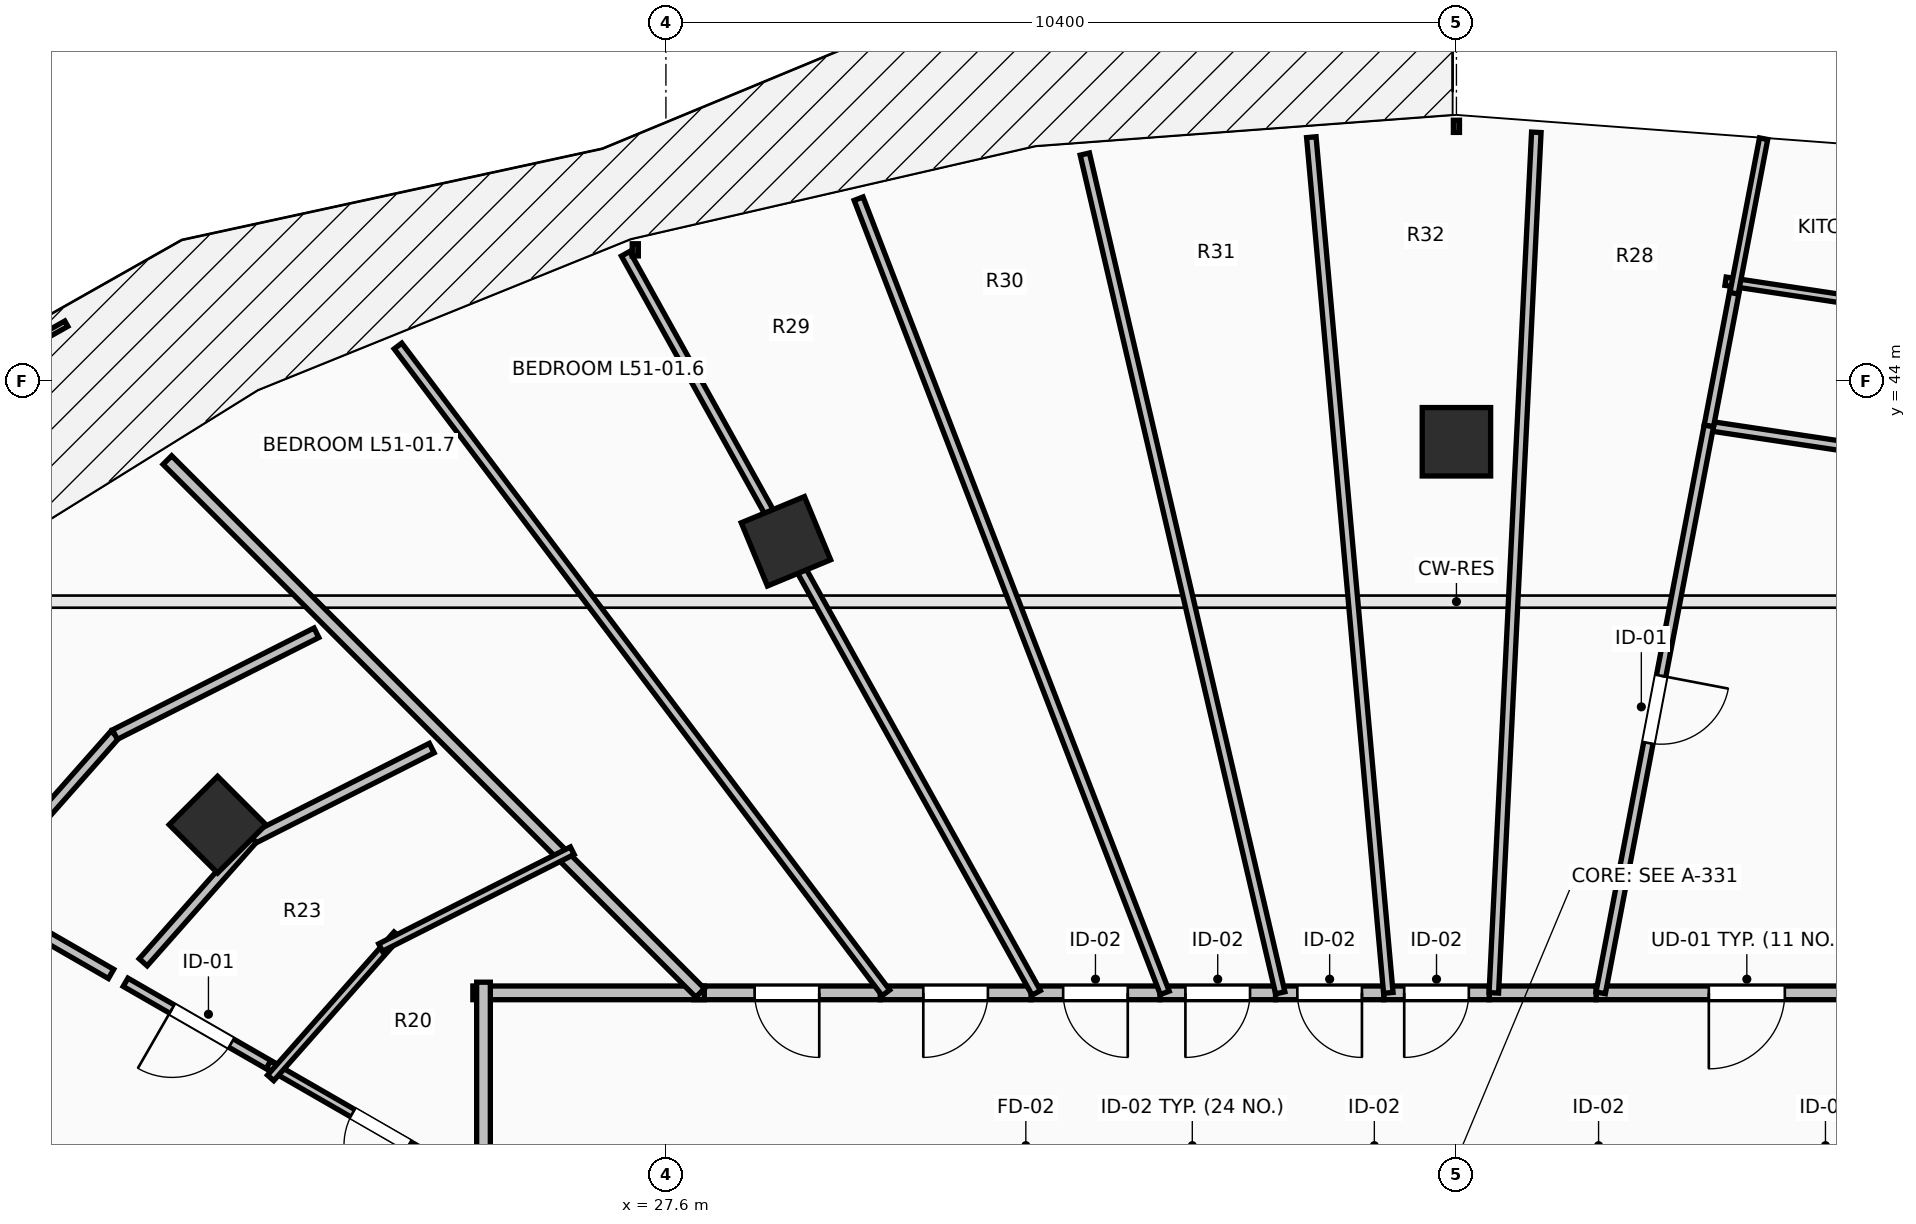
"""IFC4 building model, lengths in metres.
Left out: names, types, materials, properties, quantities, classifications, styles, units other than length and angle.
Written with IfcOpenShell. Run it as: python <this file> out.ifc"""

import sys

from ifc_helpers import new_model, si_unit, direction, frame, frame_2d, origin, origin_2d, place, context, subcontext, project, spatial, rectangle, extrude, element, fill, save


model = new_model("IFC4")
c1 = context("Model", 3, precision=1e-05, world=origin(), true_north=direction((0.0, 1.0)))
c2 = subcontext(c1, "Body", "Model", "MODEL_VIEW")
j1 = project(units=[si_unit("LENGTHUNIT", "METRE"), si_unit("PLANEANGLEUNIT", "RADIAN")], contexts=[c1])
p1 = place(None, origin())
s1 = spatial("IfcSite", under=j1, at=p1, CompositionType="ELEMENT")
p2 = place(p1, origin())
s2 = spatial("IfcBuilding", under=s1, at=p2, CompositionType="ELEMENT")
p3 = place(p2, frame((0.0, 0.0, 189.6)))
s3 = spatial("IfcBuildingStorey", under=s2, at=p3, CompositionType="ELEMENT", Elevation=189.6)
for number, where, z_axis, x_axis in (
    (1, (38.0, 43.2, 0.0), (0.0, 0.0, 1.0), (0.0, 1.0, 0.0)),
    (2, (29.179, 41.891, 0.0), (0.0, 0.0, 1.0), (-0.383, 0.924, 0.0)),
    (3, (21.701, 38.162, 0.0), (0.0, 0.0, 1.0), (-0.707, 0.707, 0.0)),
):
    element("IfcColumn", number, at=place(p3, frame(where, z_axis=z_axis, x_axis=x_axis)), inside=s3, PredefinedType="COLUMN", context=c2, shape_type="SweptSolid", body=[
        extrude(rectangle(XDim=0.9, YDim=0.9, at=origin_2d()), origin(), (0.0, 0.0, 1.0), 3.5),
    ])
p4 = place(p3, frame((43.803, 35.95, 0.0), z_axis=(0.0, 0.0, 1.0), x_axis=(-1.0, 0.0, 0.0)))
e4 = element("IfcWall", 4, at=p4, inside=s3, PredefinedType="PARTITIONING", context=c2, shape_type="SweptSolid", body=[
    extrude(rectangle(XDim=3.965, YDim=0.18, at=frame_2d((1.982, 0.0))), origin(), (0.0, 0.0, 1.0), 3.24),
])
p5 = place(p4, frame((1.482, 0.0, 0.0)))
e5 = element("IfcOpeningElement", 5, at=p5, cuts=e4, PredefinedType="OPENING", context=c2, shape_type="SweptSolid", body=[
    extrude(rectangle(XDim=1.0, YDim=2.15, at=frame_2d((0.5, 1.075))), frame((0.0, 0.105, 0.0), z_axis=(0.0, -1.0, 0.0), x_axis=(1.0, 0.0, 0.0)), (0.0, 0.0, 1.0), 0.21),
])
p6 = place(p3, frame((39.838, 35.95, 0.0), z_axis=(0.0, 0.0, 1.0), x_axis=(-1.0, 0.0, 0.0)))
e6 = element("IfcWall", 6, at=p6, inside=s3, PredefinedType="PARTITIONING", context=c2, shape_type="SweptSolid", body=[
    extrude(rectangle(XDim=1.406, YDim=0.18, at=frame_2d((0.703, 0.0))), origin(), (0.0, 0.0, 1.0), 3.24),
])
p7 = place(p3, frame((38.432, 35.95, 0.0), z_axis=(0.0, 0.0, 1.0), x_axis=(-1.0, 0.0, 0.0)))
e7 = element("IfcWall", 7, at=p7, inside=s3, PredefinedType="PARTITIONING", context=c2, shape_type="SweptSolid", body=[
    extrude(rectangle(XDim=1.388, YDim=0.18, at=frame_2d((0.694, 0.0))), origin(), (0.0, 0.0, 1.0), 3.24),
])
p8 = place(p7, frame((0.269, 0.0, 0.0)))
e8 = element("IfcOpeningElement", 8, at=p8, cuts=e7, PredefinedType="OPENING", context=c2, shape_type="SweptSolid", body=[
    extrude(rectangle(XDim=0.85, YDim=2.1, at=frame_2d((0.425, 1.05))), frame((0.0, 0.105, 0.0), z_axis=(0.0, -1.0, 0.0), x_axis=(1.0, 0.0, 0.0)), (0.0, 0.0, 1.0), 0.21),
])
p9 = place(p3, frame((37.044, 35.95, 0.0), z_axis=(0.0, 0.0, 1.0), x_axis=(-1.0, 0.0, 0.0)))
e9 = element("IfcWall", 9, at=p9, inside=s3, PredefinedType="PARTITIONING", context=c2, shape_type="SweptSolid", body=[
    extrude(rectangle(XDim=1.424, YDim=0.18, at=frame_2d((0.712, 0.0))), origin(), (0.0, 0.0, 1.0), 3.24),
])
p10 = place(p9, frame((0.287, 0.0, 0.0)))
e10 = element("IfcOpeningElement", 10, at=p10, cuts=e9, PredefinedType="OPENING", context=c2, shape_type="SweptSolid", body=[
    extrude(rectangle(XDim=0.85, YDim=2.1, at=frame_2d((0.425, 1.05))), frame((0.0, 0.105, 0.0), z_axis=(0.0, -1.0, 0.0), x_axis=(1.0, 0.0, 0.0)), (0.0, 0.0, 1.0), 0.21),
])
p11 = place(p3, frame((35.62, 35.95, 0.0), z_axis=(0.0, 0.0, 1.0), x_axis=(-1.0, 0.0, 0.0)))
e11 = element("IfcWall", 11, at=p11, inside=s3, PredefinedType="PARTITIONING", context=c2, shape_type="SweptSolid", body=[
    extrude(rectangle(XDim=1.521, YDim=0.18, at=frame_2d((0.76, 0.0))), origin(), (0.0, 0.0, 1.0), 3.24),
])
p12 = place(p11, frame((0.335, 0.0, 0.0)))
e12 = element("IfcOpeningElement", 12, at=p12, cuts=e11, PredefinedType="OPENING", context=c2, shape_type="SweptSolid", body=[
    extrude(rectangle(XDim=0.85, YDim=2.1, at=frame_2d((0.425, 1.05))), frame((0.0, 0.105, 0.0), z_axis=(0.0, -1.0, 0.0), x_axis=(1.0, 0.0, 0.0)), (0.0, 0.0, 1.0), 0.21),
])
p13 = place(p3, frame((34.099, 35.95, 0.0), z_axis=(0.0, 0.0, 1.0), x_axis=(-1.0, 0.0, 0.0)))
e13 = element("IfcWall", 13, at=p13, inside=s3, PredefinedType="PARTITIONING", context=c2, shape_type="SweptSolid", body=[
    extrude(rectangle(XDim=1.696, YDim=0.18, at=frame_2d((0.848, 0.0))), origin(), (0.0, 0.0, 1.0), 3.24),
])
p14 = place(p13, frame((0.423, 0.0, 0.0)))
e14 = element("IfcOpeningElement", 14, at=p14, cuts=e13, PredefinedType="OPENING", context=c2, shape_type="SweptSolid", body=[
    extrude(rectangle(XDim=0.85, YDim=2.1, at=frame_2d((0.425, 1.05))), frame((0.0, 0.105, 0.0), z_axis=(0.0, -1.0, 0.0), x_axis=(1.0, 0.0, 0.0)), (0.0, 0.0, 1.0), 0.21),
])
p15 = place(p3, frame((32.403, 35.95, 0.0), z_axis=(0.0, 0.0, 1.0), x_axis=(-1.0, 0.0, 0.0)))
e15 = element("IfcWall", 15, at=p15, inside=s3, PredefinedType="PARTITIONING", context=c2, shape_type="SweptSolid", body=[
    extrude(rectangle(XDim=1.984, YDim=0.18, at=frame_2d((0.992, 0.0))), origin(), (0.0, 0.0, 1.0), 2.432),
])
p16 = place(p15, frame((0.567, 0.0, 0.0)))
e16 = element("IfcOpeningElement", 16, at=p16, cuts=e15, PredefinedType="OPENING", context=c2, shape_type="SweptSolid", body=[
    extrude(rectangle(XDim=0.85, YDim=2.1, at=frame_2d((0.425, 1.05))), frame((0.0, 0.105, 0.0), z_axis=(0.0, -1.0, 0.0), x_axis=(1.0, 0.0, 0.0)), (0.0, 0.0, 1.0), 0.21),
])
p17 = place(p3, frame((30.419, 35.95, 0.0), z_axis=(0.0, 0.0, 1.0), x_axis=(-1.0, 0.0, 0.0)))
e17 = element("IfcWall", 17, at=p17, inside=s3, PredefinedType="PARTITIONING", context=c2, shape_type="SweptSolid", body=[
    extrude(rectangle(XDim=2.454, YDim=0.18, at=frame_2d((1.227, 0.0))), origin(), (0.0, 0.0, 1.0), 2.432),
])
p18 = place(p17, frame((0.802, 0.0, 0.0)))
e18 = element("IfcOpeningElement", 18, at=p18, cuts=e17, PredefinedType="OPENING", context=c2, shape_type="SweptSolid", body=[
    extrude(rectangle(XDim=0.85, YDim=2.1, at=frame_2d((0.425, 1.05))), frame((0.0, 0.105, 0.0), z_axis=(0.0, -1.0, 0.0), x_axis=(1.0, 0.0, 0.0)), (0.0, 0.0, 1.0), 0.21),
])
p19 = place(p3, frame((28.105, 35.95, 0.0), z_axis=(0.0, 0.0, 1.0), x_axis=(-1.0, 0.0, 0.0)))
e19 = element("IfcWall", 19, at=p19, inside=s3, PredefinedType="PARTITIONING", context=c2, shape_type="SweptSolid", body=[
    extrude(rectangle(XDim=3.045, YDim=0.18, at=frame_2d((1.522, 0.0))), origin(), (0.0, 0.0, 1.0), 2.432),
])
p20 = place(p3, frame((25.2, 36.09, 0.0), z_axis=(0.0, 0.0, 1.0), x_axis=(0.0, -1.0, 0.0)))
e20 = element("IfcWall", 20, at=p20, inside=s3, PredefinedType="PARTITIONING", context=c2, shape_type="SweptSolid", body=[
    extrude(rectangle(XDim=2.785, YDim=0.18, at=frame_2d((1.393, 0.0))), origin(), (0.0, 0.0, 1.0), 2.432),
])
p21 = place(p3, frame((47.018, 42.551, 0.0), z_axis=(0.0, 0.0, 1.0), x_axis=(-0.98887565722, 0.148744527827, 0.0)))
e21 = element("IfcWall", 21, at=p21, inside=s3, PredefinedType="PARTITIONING", context=c2, shape_type="SweptSolid", body=[
    extrude(rectangle(XDim=5.761, YDim=0.125, at=frame_2d((2.881, 0.0))), origin(), (0.0, 0.0, 1.0), 3.24),
])
p22 = place(p21, frame((2.43, 0.0, 0.0)))
e22 = element("IfcOpeningElement", 22, at=p22, cuts=e21, PredefinedType="OPENING", context=c2, shape_type="SweptSolid", body=[
    extrude(rectangle(XDim=0.9, YDim=2.1, at=frame_2d((0.45, 1.05))), frame((0.0, 0.077, 0.0), z_axis=(0.0, -1.0, 0.0), x_axis=(1.0, 0.0, 0.0)), (0.0, 0.0, 1.0), 0.155),
])
p23 = place(p3, frame((41.321, 43.408, 0.0), z_axis=(0.0, 0.0, 1.0), x_axis=(0.187217449549, 0.982318495491, 0.0)))
e23 = element("IfcWall", 23, at=p23, inside=s3, PredefinedType="PARTITIONING", context=c2, shape_type="SweptSolid", body=[
    extrude(rectangle(XDim=1.917, YDim=0.125, at=frame_2d((0.958, 0.0))), origin(), (0.0, 0.0, 1.0), 3.24),
])
p24 = place(p3, frame((41.321, 43.408, 0.0), z_axis=(0.0, 0.0, 1.0), x_axis=(-0.187401709503, -0.982283359971, 0.0)))
e24 = element("IfcWall", 24, at=p24, inside=s3, PredefinedType="PARTITIONING", context=c2, shape_type="SweptSolid", body=[
    extrude(rectangle(XDim=7.593, YDim=0.125, at=frame_2d((3.796, 0.0))), origin(), (0.0, 0.0, 1.0), 2.774),
])
p25 = place(p24, frame((3.346, 0.0, 0.0)))
e25 = element("IfcOpeningElement", 25, at=p25, cuts=e24, PredefinedType="OPENING", context=c2, shape_type="SweptSolid", body=[
    extrude(rectangle(XDim=0.9, YDim=2.1, at=frame_2d((0.45, 1.05))), frame((0.0, 0.077, 0.0), z_axis=(0.0, -1.0, 0.0), x_axis=(1.0, 0.0, 0.0)), (0.0, 0.0, 1.0), 0.155),
])
p26 = place(p3, frame((41.541, 45.312, 0.0), z_axis=(0.0, 0.0, 1.0), x_axis=(0.988873931206, -0.148756002172, 0.0)))
e26 = element("IfcWall", 26, at=p26, inside=s3, PredefinedType="PARTITIONING", context=c2, shape_type="SweptSolid", body=[
    extrude(rectangle(XDim=6.665, YDim=0.11, at=frame_2d((3.333, 0.0))), origin(), (0.0, 0.0, 1.0), 3.24),
])
p27 = place(p3, frame((42.041, 47.188, 0.0), z_axis=(0.0, 0.0, 1.0), x_axis=(-0.187605166264, -0.982244522301, 0.0)))
e27 = element("IfcWall", 27, at=p27, inside=s3, PredefinedType="PARTITIONING", context=c2, shape_type="SweptSolid", body=[
    extrude(rectangle(XDim=2.071, YDim=0.11, at=frame_2d((1.035, 0.0))), origin(), (0.0, 0.0, 1.0), 3.24),
])
p28 = place(p3, frame((39.051, 47.271, 0.0), z_axis=(0.0, 0.0, 1.0), x_axis=(-0.049324203907, -0.998782820692, 0.0)))
e28 = element("IfcWall", 28, at=p28, inside=s3, PredefinedType="PARTITIONING", context=c2, shape_type="SweptSolid", body=[
    extrude(rectangle(XDim=11.335, YDim=0.125, at=frame_2d((5.667, 0.0))), origin(), (0.0, 0.0, 1.0), 2.774),
])
p29 = place(p3, frame((36.091, 47.207, 0.0), z_axis=(0.0, 0.0, 1.0), x_axis=(0.089620343685, -0.995976000714, 0.0)))
e29 = element("IfcWall", 29, at=p29, inside=s3, PredefinedType="PARTITIONING", context=c2, shape_type="SweptSolid", body=[
    extrude(rectangle(XDim=11.302, YDim=0.125, at=frame_2d((5.651, 0.0))), origin(), (0.0, 0.0, 1.0), 2.432),
])
p30 = place(p3, frame((33.111, 46.985, 0.0), z_axis=(0.0, 0.0, 1.0), x_axis=(0.226889028745, -0.973920617214, 0.0)))
e30 = element("IfcWall", 30, at=p30, inside=s3, PredefinedType="PARTITIONING", context=c2, shape_type="SweptSolid", body=[
    extrude(rectangle(XDim=11.331, YDim=0.125, at=frame_2d((5.665, 0.0))), origin(), (0.0, 0.0, 1.0), 2.432),
])
p31 = place(p3, frame((30.135, 46.398, 0.0), z_axis=(0.0, 0.0, 1.0), x_axis=(0.359727007777, -0.933057597298, 0.0)))
e31 = element("IfcWall", 31, at=p31, inside=s3, PredefinedType="PARTITIONING", context=c2, shape_type="SweptSolid", body=[
    extrude(rectangle(XDim=11.198, YDim=0.125, at=frame_2d((5.599, 0.0))), origin(), (0.0, 0.0, 1.0), 2.432),
])
p32 = place(p3, frame((27.069, 45.673, 0.0), z_axis=(0.0, 0.0, 1.0), x_axis=(0.485717471054, -0.874115860921, 0.0)))
e32 = element("IfcWall", 32, at=p32, inside=s3, PredefinedType="PARTITIONING", context=c2, shape_type="SweptSolid", body=[
    extrude(rectangle(XDim=11.123, YDim=0.125, at=frame_2d((5.562, 0.0))), origin(), (0.0, 0.0, 1.0), 2.432),
])
p33 = place(p3, frame((24.075, 44.46, 0.0), z_axis=(0.0, 0.0, 1.0), x_axis=(0.602185523072, -0.798356183544, 0.0)))
e33 = element("IfcWall", 33, at=p33, inside=s3, PredefinedType="PARTITIONING", context=c2, shape_type="SweptSolid", body=[
    extrude(rectangle(XDim=10.659, YDim=0.125, at=frame_2d((5.33, 0.0))), origin(), (0.0, 0.0, 1.0), 2.432),
])
p34 = place(p3, frame((21.041, 42.959, 0.0), z_axis=(0.0, 0.0, 1.0), x_axis=(0.707106781187, -0.707106781187, 0.0)))
e34 = element("IfcWall", 34, at=p34, inside=s3, PredefinedType="PARTITIONING", context=c2, shape_type="SweptSolid", body=[
    extrude(rectangle(XDim=9.912, YDim=0.16, at=frame_2d((4.956, 0.0))), origin(), (0.0, 0.0, 1.0), 2.432),
])
p35 = place(p3, frame((22.492, 34.936, 0.0), z_axis=(0.0, 0.0, 1.0), x_axis=(-0.866435390844, 0.499289208267, 0.0)))
e35 = element("IfcWall", 35, at=p35, inside=s3, PredefinedType="PARTITIONING", context=c2, shape_type="SweptSolid", body=[
    extrude(rectangle(XDim=2.309, YDim=0.125, at=frame_2d((1.155, 0.0))), origin(), (0.0, 0.0, 1.0), 2.922),
])
p36 = place(p35, frame((0.705, 0.0, 0.0)))
e36 = element("IfcOpeningElement", 36, at=p36, cuts=e35, PredefinedType="OPENING", context=c2, shape_type="SweptSolid", body=[
    extrude(rectangle(XDim=0.9, YDim=2.1, at=frame_2d((0.45, 1.05))), frame((0.0, 0.077, 0.0), z_axis=(0.0, -1.0, 0.0), x_axis=(1.0, 0.0, 0.0)), (0.0, 0.0, 1.0), 0.155),
])
p37 = place(p3, frame((25.321, 33.306, 0.0), z_axis=(0.0, 0.0, 1.0), x_axis=(-0.866517217622, 0.49914718427, 0.0)))
e37 = element("IfcWall", 37, at=p37, inside=s3, PredefinedType="PARTITIONING", context=c2, shape_type="SweptSolid", body=[
    extrude(rectangle(XDim=3.405, YDim=0.11, at=frame_2d((1.703, 0.0))), origin(), (0.0, 0.0, 1.0), 2.922),
])
p38 = place(p37, frame((1.278, 0.0, 0.0)))
e38 = element("IfcOpeningElement", 38, at=p38, cuts=e37, PredefinedType="OPENING", context=c2, shape_type="SweptSolid", body=[
    extrude(rectangle(XDim=0.85, YDim=2.1, at=frame_2d((0.425, 1.05))), frame((0.0, 0.07, 0.0), z_axis=(0.0, -1.0, 0.0), x_axis=(1.0, 0.0, 0.0)), (0.0, 0.0, 1.0), 0.14),
])
p39 = place(p3, frame((22.399, 34.831, 0.0), z_axis=(0.0, 0.0, 1.0), x_axis=(0.662292938072, 0.749244996099, 0.0)))
e39 = element("IfcWall", 39, at=p39, inside=s3, PredefinedType="PARTITIONING", context=c2, shape_type="SweptSolid", body=[
    extrude(rectangle(XDim=2.513, YDim=0.11, at=frame_2d((1.256, 0.0))), origin(), (0.0, 0.0, 1.0), 2.432),
])
p40 = place(p3, frame((23.846, 36.546, 0.0), z_axis=(0.0, 0.0, 1.0), x_axis=(0.892553076465, 0.450942352959, 0.0)))
e40 = element("IfcWall", 40, at=p40, inside=s3, PredefinedType="PARTITIONING", context=c2, shape_type="SweptSolid", body=[
    extrude(rectangle(XDim=2.826, YDim=0.11, at=frame_2d((1.413, 0.0))), origin(), (0.0, 0.0, 1.0), 2.432),
])
p41 = place(p3, frame((18.49, 37.242, 0.0), z_axis=(0.0, 0.0, 1.0), x_axis=(0.662371376331, 0.749175653513, 0.0)))
e41 = element("IfcWall", 41, at=p41, inside=s3, PredefinedType="PARTITIONING", context=c2, shape_type="SweptSolid", body=[
    extrude(rectangle(XDim=2.81, YDim=0.14, at=frame_2d((1.405, 0.0))), origin(), (0.0, 0.0, 1.0), 3.24),
])
p42 = place(p3, frame((20.351, 39.347, 0.0), z_axis=(0.0, 0.0, 1.0), x_axis=(0.89244587056, 0.451154483653, 0.0)))
e42 = element("IfcWall", 42, at=p42, inside=s3, PredefinedType="PARTITIONING", context=c2, shape_type="SweptSolid", body=[
    extrude(rectangle(XDim=2.97, YDim=0.14, at=frame_2d((1.485, 0.0))), origin(), (0.0, 0.0, 1.0), 3.24),
])
p43 = place(p3, frame((20.3, 36.199, 0.0), z_axis=(0.0, 0.0, 1.0), x_axis=(-0.86645395742, 0.499256987604, 0.0)))
e43 = element("IfcWall", 43, at=p43, inside=s3, PredefinedType="PARTITIONING", context=c2, shape_type="SweptSolid", body=[
    extrude(rectangle(XDim=2.089, YDim=0.14, at=frame_2d((1.044, 0.0))), origin(), (0.0, 0.0, 1.0), 2.774),
])
p44 = place(p3, frame((24.519, 39.17, 0.0), z_axis=(0.0, 0.0, 1.0), x_axis=(-0.89247840077, -0.451090128643, 0.0)))
e44 = element("IfcWall", 44, at=p44, inside=s3, PredefinedType="PARTITIONING", context=c2, shape_type="SweptSolid", body=[
    extrude(rectangle(XDim=2.642, YDim=0.14, at=frame_2d((1.321, 0.0))), origin(), (0.0, 0.0, 1.0), 2.432),
])
p45 = place(p3, frame((22.161, 37.978, 0.0), z_axis=(0.0, 0.0, 1.0), x_axis=(-0.662476802918, -0.749082429106, 0.0)))
e45 = element("IfcWall", 45, at=p45, inside=s3, PredefinedType="PARTITIONING", context=c2, shape_type="SweptSolid", body=[
    extrude(rectangle(XDim=2.171, YDim=0.14, at=frame_2d((1.085, 0.0))), origin(), (0.0, 0.0, 1.0), 2.432),
])
p46 = place(p5, origin())
e46 = element("IfcDoor", 46, at=p46, inside=s3, OperationType="SINGLE_SWING_RIGHT", PredefinedType="DOOR", context=c2, shape_type="SweptSolid", body=[
    extrude(rectangle(XDim=1.0, YDim=2.15, at=frame_2d((0.5, 1.075))), frame((0.0, 0.025, 0.0), z_axis=(0.0, -1.0, 0.0), x_axis=(1.0, 0.0, 0.0)), (0.0, 0.0, 1.0), 0.05),
])
fill(e5, e46)
p47 = place(p25, origin())
e47 = element("IfcDoor", 47, at=p47, inside=s3, OperationType="SINGLE_SWING_LEFT", PredefinedType="DOOR", context=c2, shape_type="SweptSolid", body=[
    extrude(rectangle(XDim=0.9, YDim=2.1, at=frame_2d((0.45, 1.05))), frame((0.0, 0.025, 0.0), z_axis=(0.0, -1.0, 0.0), x_axis=(1.0, 0.0, 0.0)), (0.0, 0.0, 1.0), 0.05),
])
fill(e25, e47)
p48 = place(p36, origin())
e48 = element("IfcDoor", 48, at=p48, inside=s3, OperationType="SINGLE_SWING_RIGHT", PredefinedType="DOOR", context=c2, shape_type="SweptSolid", body=[
    extrude(rectangle(XDim=0.9, YDim=2.1, at=frame_2d((0.45, 1.05))), frame((0.0, 0.025, 0.0), z_axis=(0.0, -1.0, 0.0), x_axis=(1.0, 0.0, 0.0)), (0.0, 0.0, 1.0), 0.05),
])
fill(e36, e48)
p49 = place(p38, origin())
e49 = element("IfcDoor", 49, at=p49, inside=s3, OperationType="SINGLE_SWING_LEFT", PredefinedType="DOOR", context=c2, shape_type="SweptSolid", body=[
    extrude(rectangle(XDim=0.85, YDim=2.1, at=frame_2d((0.425, 1.05))), frame((0.0, 0.025, 0.0), z_axis=(0.0, -1.0, 0.0), x_axis=(1.0, 0.0, 0.0)), (0.0, 0.0, 1.0), 0.05),
])
fill(e38, e49)
p50 = place(p8, origin())
e50 = element("IfcDoor", 50, at=p50, inside=s3, OperationType="SINGLE_SWING_RIGHT", PredefinedType="DOOR", context=c2, shape_type="SweptSolid", body=[
    extrude(rectangle(XDim=0.85, YDim=2.1, at=frame_2d((0.425, 1.05))), frame((0.0, 0.025, 0.0), z_axis=(0.0, -1.0, 0.0), x_axis=(1.0, 0.0, 0.0)), (0.0, 0.0, 1.0), 0.05),
])
fill(e8, e50)
p51 = place(p10, origin())
e51 = element("IfcDoor", 51, at=p51, inside=s3, OperationType="SINGLE_SWING_LEFT", PredefinedType="DOOR", context=c2, shape_type="SweptSolid", body=[
    extrude(rectangle(XDim=0.85, YDim=2.1, at=frame_2d((0.425, 1.05))), frame((0.0, 0.025, 0.0), z_axis=(0.0, -1.0, 0.0), x_axis=(1.0, 0.0, 0.0)), (0.0, 0.0, 1.0), 0.05),
])
fill(e10, e51)
p52 = place(p12, origin())
e52 = element("IfcDoor", 52, at=p52, inside=s3, OperationType="SINGLE_SWING_RIGHT", PredefinedType="DOOR", context=c2, shape_type="SweptSolid", body=[
    extrude(rectangle(XDim=0.85, YDim=2.1, at=frame_2d((0.425, 1.05))), frame((0.0, 0.025, 0.0), z_axis=(0.0, -1.0, 0.0), x_axis=(1.0, 0.0, 0.0)), (0.0, 0.0, 1.0), 0.05),
])
fill(e12, e52)
p53 = place(p14, origin())
e53 = element("IfcDoor", 53, at=p53, inside=s3, OperationType="SINGLE_SWING_LEFT", PredefinedType="DOOR", context=c2, shape_type="SweptSolid", body=[
    extrude(rectangle(XDim=0.85, YDim=2.1, at=frame_2d((0.425, 1.05))), frame((0.0, 0.025, 0.0), z_axis=(0.0, -1.0, 0.0), x_axis=(1.0, 0.0, 0.0)), (0.0, 0.0, 1.0), 0.05),
])
fill(e14, e53)
p54 = place(p16, origin())
e54 = element("IfcDoor", 54, at=p54, inside=s3, OperationType="SINGLE_SWING_RIGHT", PredefinedType="DOOR", context=c2, shape_type="SweptSolid", body=[
    extrude(rectangle(XDim=0.85, YDim=2.1, at=frame_2d((0.425, 1.05))), frame((0.0, 0.025, 0.0), z_axis=(0.0, -1.0, 0.0), x_axis=(1.0, 0.0, 0.0)), (0.0, 0.0, 1.0), 0.05),
])
fill(e16, e54)
p55 = place(p18, origin())
e55 = element("IfcDoor", 55, at=p55, inside=s3, OperationType="SINGLE_SWING_LEFT", PredefinedType="DOOR", context=c2, shape_type="SweptSolid", body=[
    extrude(rectangle(XDim=0.85, YDim=2.1, at=frame_2d((0.425, 1.05))), frame((0.0, 0.025, 0.0), z_axis=(0.0, -1.0, 0.0), x_axis=(1.0, 0.0, 0.0)), (0.0, 0.0, 1.0), 0.05),
])
fill(e18, e55)
save(model, sys.argv[1])
